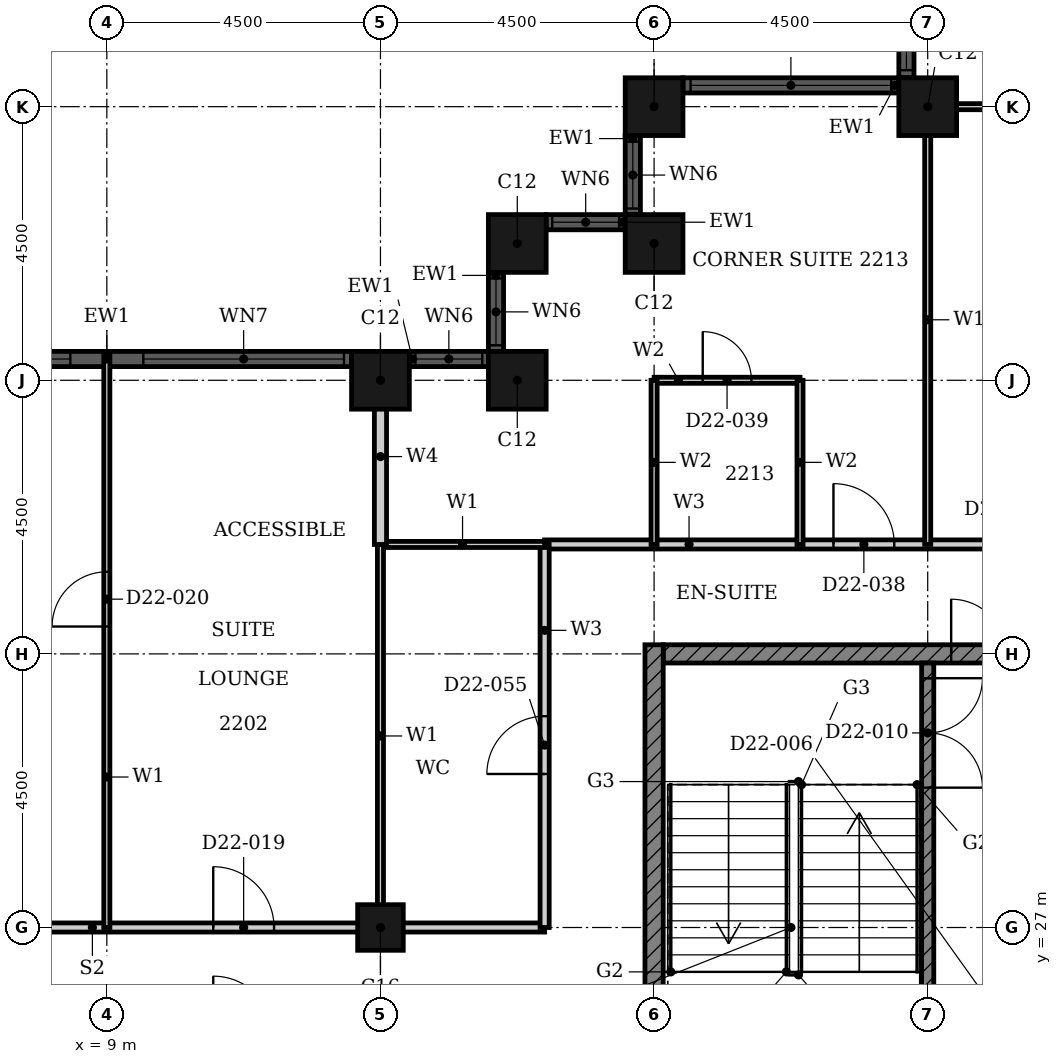
"""IFC4 building model, lengths in metres.
Left out: names, types, materials, properties, quantities, classifications, styles, units other than length and angle.
Written with IfcOpenShell. Run it as: python <this file> out.ifc"""

import sys

from ifc_helpers import new_model, si_unit, direction, frame, frame_2d, origin, origin_2d, place, context, subcontext, project, spatial, rectangle, hollow_rectangle, extrude, element, fill, save


model = new_model("IFC4")
c1 = context("Model", 3, precision=1e-05, world=origin(), true_north=direction((0.0, 1.0)))
c2 = subcontext(c1, "Body", "Model", "MODEL_VIEW")
j1 = project(units=[si_unit("LENGTHUNIT", "METRE"), si_unit("PLANEANGLEUNIT", "RADIAN")], contexts=[c1])
p1 = place(None, origin())
s1 = spatial("IfcSite", under=j1, at=p1, CompositionType="ELEMENT")
p2 = place(p1, origin())
s2 = spatial("IfcBuilding", under=s1, at=p2, CompositionType="ELEMENT")
p3 = place(p2, frame((0.0, 0.0, 92.4)))
s3 = spatial("IfcBuildingStorey", under=s2, at=p3, CompositionType="ELEMENT", Elevation=92.4)
for number, where, z_axis, x_axis in (
    (1, (22.5, 40.5, 0.0), (0.0, 0.0, 1.0), (1.0, 0.0, 0.0)),
    (2, (18.0, 40.5, 0.0), (0.0, 0.0, 1.0), (1.0, 0.0, 0.0)),
    (3, (18.0, 38.25, 0.0), (0.0, 0.0, 1.0), (1.0, 0.0, 0.0)),
    (4, (15.75, 38.25, 0.0), (0.0, 0.0, 1.0), (1.0, 0.0, 0.0)),
    (5, (15.75, 36.0, 0.0), (0.0, 0.0, 1.0), (1.0, 0.0, 0.0)),
    (6, (13.5, 36.0, 0.0), (0.0, 0.0, 1.0), (1.0, 0.0, 0.0)),
):
    element("IfcColumn", number, at=place(p3, frame(where, z_axis=z_axis, x_axis=x_axis)), inside=s3, PredefinedType="COLUMN", context=c2, shape_type="SweptSolid", body=[
        extrude(hollow_rectangle(XDim=0.95, YDim=0.95, WallThickness=0.03, at=origin_2d()), origin(), (0.0, 0.0, 1.0), 3.6),
    ])
p4 = place(p3, frame((13.5, 27.0, 0.0), z_axis=(0.0, 0.0, 1.0), x_axis=(1.0, 0.0, 0.0)))
e7 = element("IfcColumn", 7, at=p4, inside=s3, PredefinedType="COLUMN", context=c2, shape_type="SweptSolid", body=[
    extrude(hollow_rectangle(XDim=0.75, YDim=0.75, WallThickness=0.024, at=origin_2d()), origin(), (0.0, 0.0, 1.0), 3.6),
])
p5 = place(p3, frame((22.15, 49.025, 0.0), z_axis=(0.0, 0.0, 1.0), x_axis=(0.0, -1.0, 0.0)))
e8 = element("IfcWall", 8, at=p5, inside=s3, PredefinedType="SOLIDWALL", context=c2, shape_type="SweptSolid", body=[
    extrude(rectangle(XDim=8.05, YDim=0.25, at=frame_2d((4.025, 0.0))), origin(), (0.0, 0.0, 1.0), 3.6),
])
p6 = place(p5, frame((0.125, 0.0, 0.9)))
e9 = element("IfcOpeningElement", 9, at=p6, cuts=e8, PredefinedType="OPENING", context=c2, shape_type="SweptSolid", body=[
    extrude(rectangle(XDim=3.3, YDim=1.85, at=frame_2d((1.65, 0.925))), frame((0.0, 0.135, 0.0), z_axis=(0.0, -1.0, 0.0), x_axis=(1.0, 0.0, 0.0)), (0.0, 0.0, 1.0), 0.27),
])
p7 = place(p5, frame((4.625, 0.0, 0.9)))
e10 = element("IfcOpeningElement", 10, at=p7, cuts=e8, PredefinedType="OPENING", context=c2, shape_type="SweptSolid", body=[
    extrude(rectangle(XDim=3.3, YDim=1.85, at=frame_2d((1.65, 0.925))), frame((0.0, 0.135, 0.0), z_axis=(0.0, -1.0, 0.0), x_axis=(1.0, 0.0, 0.0)), (0.0, 0.0, 1.0), 0.27),
])
p8 = place(p3, frame((22.025, 40.85, 0.0), z_axis=(0.0, 0.0, 1.0), x_axis=(-1.0, 0.0, 0.0)))
e11 = element("IfcWall", 11, at=p8, inside=s3, PredefinedType="SOLIDWALL", context=c2, shape_type="SweptSolid", body=[
    extrude(rectangle(XDim=3.55, YDim=0.25, at=frame_2d((1.775, 0.0))), origin(), (0.0, 0.0, 1.0), 3.6),
])
p9 = place(p8, frame((0.125, 0.0, 0.9)))
e12 = element("IfcOpeningElement", 12, at=p9, cuts=e11, PredefinedType="OPENING", context=c2, shape_type="SweptSolid", body=[
    extrude(rectangle(XDim=3.3, YDim=1.85, at=frame_2d((1.65, 0.925))), frame((0.0, 0.135, 0.0), z_axis=(0.0, -1.0, 0.0), x_axis=(1.0, 0.0, 0.0)), (0.0, 0.0, 1.0), 0.27),
])
p10 = place(p3, frame((17.65, 40.025, 0.0), z_axis=(0.0, 0.0, 1.0), x_axis=(0.0, -1.0, 0.0)))
e13 = element("IfcWall", 13, at=p10, inside=s3, PredefinedType="SOLIDWALL", context=c2, shape_type="SweptSolid", body=[
    extrude(rectangle(XDim=1.3, YDim=0.25, at=frame_2d((0.65, 0.0))), origin(), (0.0, 0.0, 1.0), 3.6),
])
p11 = place(p10, frame((0.1, 0.0, 0.9)))
e14 = element("IfcOpeningElement", 14, at=p11, cuts=e13, PredefinedType="OPENING", context=c2, shape_type="SweptSolid", body=[
    extrude(rectangle(XDim=1.1, YDim=1.85, at=frame_2d((0.55, 0.925))), frame((0.0, 0.135, 0.0), z_axis=(0.0, -1.0, 0.0), x_axis=(1.0, 0.0, 0.0)), (0.0, 0.0, 1.0), 0.27),
])
p12 = place(p3, frame((17.525, 38.6, 0.0), z_axis=(0.0, 0.0, 1.0), x_axis=(-1.0, 0.0, 0.0)))
e15 = element("IfcWall", 15, at=p12, inside=s3, PredefinedType="SOLIDWALL", context=c2, shape_type="SweptSolid", body=[
    extrude(rectangle(XDim=1.3, YDim=0.25, at=frame_2d((0.65, 0.0))), origin(), (0.0, 0.0, 1.0), 3.6),
])
p13 = place(p12, frame((0.1, 0.0, 0.9)))
e16 = element("IfcOpeningElement", 16, at=p13, cuts=e15, PredefinedType="OPENING", context=c2, shape_type="SweptSolid", body=[
    extrude(rectangle(XDim=1.1, YDim=1.85, at=frame_2d((0.55, 0.925))), frame((0.0, 0.135, 0.0), z_axis=(0.0, -1.0, 0.0), x_axis=(1.0, 0.0, 0.0)), (0.0, 0.0, 1.0), 0.27),
])
p14 = place(p3, frame((15.4, 37.775, 0.0), z_axis=(0.0, 0.0, 1.0), x_axis=(0.0, -1.0, 0.0)))
e17 = element("IfcWall", 17, at=p14, inside=s3, PredefinedType="SOLIDWALL", context=c2, shape_type="SweptSolid", body=[
    extrude(rectangle(XDim=1.3, YDim=0.25, at=frame_2d((0.65, 0.0))), origin(), (0.0, 0.0, 1.0), 3.6),
])
p15 = place(p14, frame((0.1, 0.0, 0.9)))
e18 = element("IfcOpeningElement", 18, at=p15, cuts=e17, PredefinedType="OPENING", context=c2, shape_type="SweptSolid", body=[
    extrude(rectangle(XDim=1.1, YDim=1.85, at=frame_2d((0.55, 0.925))), frame((0.0, 0.135, 0.0), z_axis=(0.0, -1.0, 0.0), x_axis=(1.0, 0.0, 0.0)), (0.0, 0.0, 1.0), 0.27),
])
p16 = place(p3, frame((15.275, 36.35, 0.0), z_axis=(0.0, 0.0, 1.0), x_axis=(-1.0, 0.0, 0.0)))
e19 = element("IfcWall", 19, at=p16, inside=s3, PredefinedType="SOLIDWALL", context=c2, shape_type="SweptSolid", body=[
    extrude(rectangle(XDim=1.3, YDim=0.25, at=frame_2d((0.65, 0.0))), origin(), (0.0, 0.0, 1.0), 3.6),
])
p17 = place(p16, frame((0.1, 0.0, 0.9)))
e20 = element("IfcOpeningElement", 20, at=p17, cuts=e19, PredefinedType="OPENING", context=c2, shape_type="SweptSolid", body=[
    extrude(rectangle(XDim=1.1, YDim=1.85, at=frame_2d((0.55, 0.925))), frame((0.0, 0.135, 0.0), z_axis=(0.0, -1.0, 0.0), x_axis=(1.0, 0.0, 0.0)), (0.0, 0.0, 1.0), 0.27),
])
p18 = place(p3, frame((13.025, 36.35, 0.0), z_axis=(0.0, 0.0, 1.0), x_axis=(-1.0, 0.0, 0.0)))
e21 = element("IfcWall", 21, at=p18, inside=s3, PredefinedType="SOLIDWALL", context=c2, shape_type="SweptSolid", body=[
    extrude(rectangle(XDim=8.05, YDim=0.25, at=frame_2d((4.025, 0.0))), origin(), (0.0, 0.0, 1.0), 3.6),
])
p19 = place(p18, frame((0.125, 0.0, 0.9)))
e22 = element("IfcOpeningElement", 22, at=p19, cuts=e21, PredefinedType="OPENING", context=c2, shape_type="SweptSolid", body=[
    extrude(rectangle(XDim=3.3, YDim=1.85, at=frame_2d((1.65, 0.925))), frame((0.0, 0.135, 0.0), z_axis=(0.0, -1.0, 0.0), x_axis=(1.0, 0.0, 0.0)), (0.0, 0.0, 1.0), 0.27),
])
p20 = place(p18, frame((4.625, 0.0, 0.9)))
e23 = element("IfcOpeningElement", 23, at=p20, cuts=e21, PredefinedType="OPENING", context=c2, shape_type="SweptSolid", body=[
    extrude(rectangle(XDim=3.3, YDim=1.85, at=frame_2d((1.65, 0.925))), frame((0.0, 0.135, 0.0), z_axis=(0.0, -1.0, 0.0), x_axis=(1.0, 0.0, 0.0)), (0.0, 0.0, 1.0), 0.27),
])
p21 = place(p3, frame((18.15, 31.5, 0.0), z_axis=(0.0, 0.0, 1.0), x_axis=(1.0, 0.0, 0.0)))
e24 = element("IfcWall", 24, at=p21, inside=s3, PredefinedType="SHEAR", context=c2, shape_type="SweptSolid", body=[
    extrude(rectangle(XDim=6.797, YDim=0.3, at=frame_2d((3.398, 0.0))), origin(), (0.0, 0.0, 1.0), 3.2),
])
p22 = place(p21, frame((4.736, 0.0, 0.0)))
e25 = element("IfcOpeningElement", 25, at=p22, cuts=e24, PredefinedType="OPENING", context=c2, shape_type="SweptSolid", body=[
    extrude(rectangle(XDim=1.8, YDim=2.1, at=frame_2d((0.9, 1.05))), frame((0.0, 0.16, 0.0), z_axis=(0.0, -1.0, 0.0), x_axis=(1.0, 0.0, 0.0)), (0.0, 0.0, 1.0), 0.32),
])
p23 = place(p3, frame((18.0, 22.35, 0.0), z_axis=(0.0, 0.0, 1.0), x_axis=(0.0, 1.0, 0.0)))
e26 = element("IfcWall", 26, at=p23, inside=s3, PredefinedType="SHEAR", context=c2, shape_type="SweptSolid", body=[
    extrude(rectangle(XDim=9.3, YDim=0.3, at=frame_2d((4.65, 0.0))), origin(), (0.0, 0.0, 1.0), 3.2),
])
p24 = place(p3, frame((22.5, 31.35, 0.0), z_axis=(0.0, 0.0, 1.0), x_axis=(0.0, -1.0, 0.0)))
e27 = element("IfcWall", 27, at=p24, inside=s3, PredefinedType="SHEAR", context=c2, shape_type="SweptSolid", body=[
    extrude(rectangle(XDim=5.825, YDim=0.2, at=frame_2d((2.913, 0.0))), origin(), (0.0, 0.0, 1.0), 3.2),
])
p25 = place(p24, frame((0.25, 0.0, 0.0)))
e28 = element("IfcOpeningElement", 28, at=p25, cuts=e27, PredefinedType="OPENING", context=c2, shape_type="SweptSolid", body=[
    extrude(rectangle(XDim=1.8, YDim=2.1, at=frame_2d((0.9, 1.05))), frame((0.0, 0.11, 0.0), z_axis=(0.0, -1.0, 0.0), x_axis=(1.0, 0.0, 0.0)), (0.0, 0.0, 1.0), 0.22),
])
p26 = place(p3, frame((4.5, 27.0, 0.0), z_axis=(0.0, 0.0, 1.0), x_axis=(1.0, 0.0, 0.0)))
e29 = element("IfcWall", 29, at=p26, inside=s3, PredefinedType="PARTITIONING", context=c2, shape_type="SweptSolid", body=[
    extrude(rectangle(XDim=11.7, YDim=0.15, at=frame_2d((5.85, 0.0))), origin(), (0.0, 0.0, 1.0), 2.48),
])
p27 = place(p26, frame((6.25, 0.0, 0.0)))
e30 = element("IfcOpeningElement", 30, at=p27, cuts=e29, PredefinedType="OPENING", context=c2, shape_type="SweptSolid", body=[
    extrude(rectangle(XDim=1.0, YDim=2.1, at=frame_2d((0.5, 1.05))), frame((0.0, 0.085, 0.0), z_axis=(0.0, -1.0, 0.0), x_axis=(1.0, 0.0, 0.0)), (0.0, 0.0, 1.0), 0.17),
])
p28 = place(p3, frame((16.2, 33.3, 0.0), z_axis=(0.0, 0.0, 1.0), x_axis=(1.0, 0.0, 0.0)))
e31 = element("IfcWall", 31, at=p28, inside=s3, PredefinedType="PARTITIONING", context=c2, shape_type="SweptSolid", body=[
    extrude(rectangle(XDim=15.3, YDim=0.15, at=frame_2d((7.65, 0.0))), origin(), (0.0, 0.0, 1.0), 3.2),
])
p29 = place(p28, frame((4.75, 0.0, 0.0)))
e32 = element("IfcOpeningElement", 32, at=p29, cuts=e31, PredefinedType="OPENING", context=c2, shape_type="SweptSolid", body=[
    extrude(rectangle(XDim=1.0, YDim=2.1, at=frame_2d((0.5, 1.05))), frame((0.0, 0.085, 0.0), z_axis=(0.0, -1.0, 0.0), x_axis=(1.0, 0.0, 0.0)), (0.0, 0.0, 1.0), 0.17),
])
p30 = place(p28, frame((10.35, 0.0, 0.0)))
e33 = element("IfcOpeningElement", 33, at=p30, cuts=e31, PredefinedType="OPENING", context=c2, shape_type="SweptSolid", body=[
    extrude(rectangle(XDim=0.9, YDim=2.1, at=frame_2d((0.45, 1.05))), frame((0.0, 0.085, 0.0), z_axis=(0.0, -1.0, 0.0), x_axis=(1.0, 0.0, 0.0)), (0.0, 0.0, 1.0), 0.17),
])
p31 = place(p3, frame((16.2, 27.0, 0.0), z_axis=(0.0, 0.0, 1.0), x_axis=(0.0, 1.0, 0.0)))
e34 = element("IfcWall", 34, at=p31, inside=s3, PredefinedType="PARTITIONING", context=c2, shape_type="SweptSolid", body=[
    extrude(rectangle(XDim=6.3, YDim=0.15, at=frame_2d((3.15, 0.0))), origin(), (0.0, 0.0, 1.0), 3.2),
])
p32 = place(p31, frame((2.525, 0.0, 0.0)))
e35 = element("IfcOpeningElement", 35, at=p32, cuts=e34, PredefinedType="OPENING", context=c2, shape_type="SweptSolid", body=[
    extrude(rectangle(XDim=0.95, YDim=2.1, at=frame_2d((0.475, 1.05))), frame((0.0, 0.085, 0.0), z_axis=(0.0, -1.0, 0.0), x_axis=(1.0, 0.0, 0.0)), (0.0, 0.0, 1.0), 0.17),
])
p33 = place(p3, frame((13.5, 33.3, 0.0), z_axis=(0.0, 0.0, 1.0), x_axis=(1.0, 0.0, 0.0)))
e36 = element("IfcWall", 36, at=p33, inside=s3, PredefinedType="PARTITIONING", context=c2, shape_type="SweptSolid", body=[
    extrude(rectangle(XDim=2.7, YDim=0.1, at=frame_2d((1.35, 0.0))), origin(), (0.0, 0.0, 1.0), 3.2),
])
p34 = place(p3, frame((22.31, 40.5, 0.0), z_axis=(0.0, 0.0, 1.0), x_axis=(1.0, 0.0, 0.0)))
e37 = element("IfcWall", 37, at=p34, inside=s3, PredefinedType="PARTITIONING", context=c2, shape_type="SweptSolid", body=[
    extrude(rectangle(XDim=9.19, YDim=0.1, at=frame_2d((4.595, 0.0))), origin(), (0.0, 0.0, 1.0), 2.28),
])
p35 = place(p3, frame((13.5, 27.0, 0.0), z_axis=(0.0, 0.0, 1.0), x_axis=(0.0, 1.0, 0.0)))
e38 = element("IfcWall", 38, at=p35, inside=s3, PredefinedType="PARTITIONING", context=c2, shape_type="SweptSolid", body=[
    extrude(rectangle(XDim=6.3, YDim=0.1, at=frame_2d((3.15, 0.0))), origin(), (0.0, 0.0, 1.0), 2.28),
])
p36 = place(p3, frame((22.5, 33.3, 0.0), z_axis=(0.0, 0.0, 1.0), x_axis=(0.0, 1.0, 0.0)))
e39 = element("IfcWall", 39, at=p36, inside=s3, PredefinedType="PARTITIONING", context=c2, shape_type="SweptSolid", body=[
    extrude(rectangle(XDim=7.39, YDim=0.1, at=frame_2d((3.695, 0.0))), origin(), (0.0, 0.0, 1.0), 3.2),
])
p37 = place(p3, frame((9.0, 27.0, 0.0), z_axis=(0.0, 0.0, 1.0), x_axis=(0.0, 1.0, 0.0)))
e40 = element("IfcWall", 40, at=p37, inside=s3, PredefinedType="PARTITIONING", context=c2, shape_type="SweptSolid", body=[
    extrude(rectangle(XDim=9.415, YDim=0.1, at=frame_2d((4.708, 0.0))), origin(), (0.0, 0.0, 1.0), 3.2),
])
p38 = place(p37, frame((4.95, 0.0, 0.0)))
e41 = element("IfcOpeningElement", 41, at=p38, cuts=e40, PredefinedType="OPENING", context=c2, shape_type="SweptSolid", body=[
    extrude(rectangle(XDim=0.9, YDim=2.1, at=frame_2d((0.45, 1.05))), frame((0.0, 0.06, 0.0), z_axis=(0.0, -1.0, 0.0), x_axis=(1.0, 0.0, 0.0)), (0.0, 0.0, 1.0), 0.12),
])
p39 = place(p3, frame((13.5, 33.3, 0.0), z_axis=(0.0, 0.0, 1.0), x_axis=(0.0, 1.0, 0.0)))
e42 = element("IfcWall", 42, at=p39, inside=s3, PredefinedType="PARTITIONING", context=c2, shape_type="SweptSolid", body=[
    extrude(rectangle(XDim=2.89, YDim=0.2, at=frame_2d((1.445, 0.0))), origin(), (0.0, 0.0, 1.0), 2.28),
])
p40 = place(p3, frame((18.0, 36.0, 0.0), z_axis=(0.0, 0.0, 1.0), x_axis=(1.0, 0.0, 0.0)))
e43 = element("IfcWall", 43, at=p40, inside=s3, PredefinedType="PARTITIONING", context=c2, shape_type="SweptSolid", body=[
    extrude(rectangle(XDim=2.4, YDim=0.1, at=frame_2d((1.2, 0.0))), origin(), (0.0, 0.0, 1.0), 3.2),
])
p41 = place(p40, frame((0.8, 0.0, 0.0)))
e44 = element("IfcOpeningElement", 44, at=p41, cuts=e43, PredefinedType="OPENING", context=c2, shape_type="SweptSolid", body=[
    extrude(rectangle(XDim=0.8, YDim=2.1, at=frame_2d((0.4, 1.05))), frame((0.0, 0.06, 0.0), z_axis=(0.0, -1.0, 0.0), x_axis=(1.0, 0.0, 0.0)), (0.0, 0.0, 1.0), 0.12),
])
for number, where, z_axis, x_axis in (
    (45, (18.0, 33.3, 0.0), (0.0, 0.0, 1.0), (0.0, 1.0, 0.0)),
    (46, (20.4, 33.3, 0.0), (0.0, 0.0, 1.0), (0.0, 1.0, 0.0)),
):
    element("IfcWall", number, at=place(p3, frame(where, z_axis=z_axis, x_axis=x_axis)), inside=s3, PredefinedType="PARTITIONING", context=c2, shape_type="SweptSolid", body=[
        extrude(rectangle(XDim=2.7, YDim=0.1, at=frame_2d((1.35, 0.0))), origin(), (0.0, 0.0, 1.0), 3.2),
    ])
p42 = place(p7, origin())
e47 = element("IfcWindow", 47, at=p42, inside=s3, PartitioningType="SINGLE_PANEL", PredefinedType="WINDOW", context=c2, shape_type="SweptSolid", body=[
    extrude(rectangle(XDim=3.3, YDim=1.85, at=frame_2d((1.65, 0.925))), frame((0.0, 0.03, 0.0), z_axis=(0.0, -1.0, 0.0), x_axis=(1.0, 0.0, 0.0)), (0.0, 0.0, 1.0), 0.06),
])
fill(e10, e47)
p43 = place(p9, origin())
e48 = element("IfcWindow", 48, at=p43, inside=s3, PartitioningType="SINGLE_PANEL", PredefinedType="WINDOW", context=c2, shape_type="SweptSolid", body=[
    extrude(rectangle(XDim=3.3, YDim=1.85, at=frame_2d((1.65, 0.925))), frame((0.0, 0.03, 0.0), z_axis=(0.0, -1.0, 0.0), x_axis=(1.0, 0.0, 0.0)), (0.0, 0.0, 1.0), 0.06),
])
fill(e12, e48)
p44 = place(p11, origin())
e49 = element("IfcWindow", 49, at=p44, inside=s3, PartitioningType="SINGLE_PANEL", PredefinedType="WINDOW", context=c2, shape_type="SweptSolid", body=[
    extrude(rectangle(XDim=1.1, YDim=1.85, at=frame_2d((0.55, 0.925))), frame((0.0, 0.03, 0.0), z_axis=(0.0, -1.0, 0.0), x_axis=(1.0, 0.0, 0.0)), (0.0, 0.0, 1.0), 0.06),
])
fill(e14, e49)
p45 = place(p13, origin())
e50 = element("IfcWindow", 50, at=p45, inside=s3, PartitioningType="SINGLE_PANEL", PredefinedType="WINDOW", context=c2, shape_type="SweptSolid", body=[
    extrude(rectangle(XDim=1.1, YDim=1.85, at=frame_2d((0.55, 0.925))), frame((0.0, 0.03, 0.0), z_axis=(0.0, -1.0, 0.0), x_axis=(1.0, 0.0, 0.0)), (0.0, 0.0, 1.0), 0.06),
])
fill(e16, e50)
p46 = place(p15, origin())
e51 = element("IfcWindow", 51, at=p46, inside=s3, PartitioningType="SINGLE_PANEL", PredefinedType="WINDOW", context=c2, shape_type="SweptSolid", body=[
    extrude(rectangle(XDim=1.1, YDim=1.85, at=frame_2d((0.55, 0.925))), frame((0.0, 0.03, 0.0), z_axis=(0.0, -1.0, 0.0), x_axis=(1.0, 0.0, 0.0)), (0.0, 0.0, 1.0), 0.06),
])
fill(e18, e51)
p47 = place(p17, origin())
e52 = element("IfcWindow", 52, at=p47, inside=s3, PartitioningType="SINGLE_PANEL", PredefinedType="WINDOW", context=c2, shape_type="SweptSolid", body=[
    extrude(rectangle(XDim=1.1, YDim=1.85, at=frame_2d((0.55, 0.925))), frame((0.0, 0.03, 0.0), z_axis=(0.0, -1.0, 0.0), x_axis=(1.0, 0.0, 0.0)), (0.0, 0.0, 1.0), 0.06),
])
fill(e20, e52)
p48 = place(p19, origin())
e53 = element("IfcWindow", 53, at=p48, inside=s3, PartitioningType="SINGLE_PANEL", PredefinedType="WINDOW", context=c2, shape_type="SweptSolid", body=[
    extrude(rectangle(XDim=3.3, YDim=1.85, at=frame_2d((1.65, 0.925))), frame((0.0, 0.03, 0.0), z_axis=(0.0, -1.0, 0.0), x_axis=(1.0, 0.0, 0.0)), (0.0, 0.0, 1.0), 0.06),
])
fill(e22, e53)
p49 = place(p20, origin())
e54 = element("IfcWindow", 54, at=p49, inside=s3, PartitioningType="SINGLE_PANEL", PredefinedType="WINDOW", context=c2, shape_type="SweptSolid", body=[
    extrude(rectangle(XDim=3.3, YDim=1.85, at=frame_2d((1.65, 0.925))), frame((0.0, 0.03, 0.0), z_axis=(0.0, -1.0, 0.0), x_axis=(1.0, 0.0, 0.0)), (0.0, 0.0, 1.0), 0.06),
])
fill(e23, e54)
p50 = place(p25, origin())
e55 = element("IfcDoor", 55, at=p50, inside=s3, OperationType="DOUBLE_DOOR_SINGLE_SWING", PredefinedType="DOOR", context=c2, shape_type="SweptSolid", body=[
    extrude(rectangle(XDim=1.8, YDim=2.1, at=frame_2d((0.9, 1.05))), frame((0.0, 0.025, 0.0), z_axis=(0.0, -1.0, 0.0), x_axis=(1.0, 0.0, 0.0)), (0.0, 0.0, 1.0), 0.05),
])
fill(e28, e55)
p51 = place(p22, origin())
e56 = element("IfcDoor", 56, at=p51, inside=s3, OperationType="DOUBLE_DOOR_SINGLE_SWING", PredefinedType="DOOR", context=c2, shape_type="SweptSolid", body=[
    extrude(rectangle(XDim=1.8, YDim=2.1, at=frame_2d((0.9, 1.05))), frame((0.0, 0.025, 0.0), z_axis=(0.0, -1.0, 0.0), x_axis=(1.0, 0.0, 0.0)), (0.0, 0.0, 1.0), 0.05),
])
fill(e25, e56)
p52 = place(p27, origin())
e57 = element("IfcDoor", 57, at=p52, inside=s3, OperationType="SINGLE_SWING_RIGHT", PredefinedType="DOOR", context=c2, shape_type="SweptSolid", body=[
    extrude(rectangle(XDim=1.0, YDim=2.1, at=frame_2d((0.5, 1.05))), frame((0.0, 0.025, 0.0), z_axis=(0.0, -1.0, 0.0), x_axis=(1.0, 0.0, 0.0)), (0.0, 0.0, 1.0), 0.05),
])
fill(e30, e57)
p53 = place(p38, origin())
e58 = element("IfcDoor", 58, at=p53, inside=s3, OperationType="SINGLE_SWING_RIGHT", PredefinedType="DOOR", context=c2, shape_type="SweptSolid", body=[
    extrude(rectangle(XDim=0.9, YDim=2.1, at=frame_2d((0.45, 1.05))), frame((0.0, 0.025, 0.0), z_axis=(0.0, -1.0, 0.0), x_axis=(1.0, 0.0, 0.0)), (0.0, 0.0, 1.0), 0.05),
])
fill(e41, e58)
p54 = place(p29, origin())
e59 = element("IfcDoor", 59, at=p54, inside=s3, OperationType="SINGLE_SWING_RIGHT", PredefinedType="DOOR", context=c2, shape_type="SweptSolid", body=[
    extrude(rectangle(XDim=1.0, YDim=2.1, at=frame_2d((0.5, 1.05))), frame((0.0, 0.025, 0.0), z_axis=(0.0, -1.0, 0.0), x_axis=(1.0, 0.0, 0.0)), (0.0, 0.0, 1.0), 0.05),
])
fill(e32, e59)
p55 = place(p41, origin())
e60 = element("IfcDoor", 60, at=p55, inside=s3, OperationType="SINGLE_SWING_LEFT", PredefinedType="DOOR", context=c2, shape_type="SweptSolid", body=[
    extrude(rectangle(XDim=0.8, YDim=2.1, at=frame_2d((0.4, 1.05))), frame((0.0, 0.025, 0.0), z_axis=(0.0, -1.0, 0.0), x_axis=(1.0, 0.0, 0.0)), (0.0, 0.0, 1.0), 0.05),
])
fill(e44, e60)
p56 = place(p32, origin())
e61 = element("IfcDoor", 61, at=p56, inside=s3, OperationType="SINGLE_SWING_LEFT", PredefinedType="DOOR", context=c2, shape_type="SweptSolid", body=[
    extrude(rectangle(XDim=0.95, YDim=2.1, at=frame_2d((0.475, 1.05))), frame((0.0, 0.025, 0.0), z_axis=(0.0, -1.0, 0.0), x_axis=(1.0, 0.0, 0.0)), (0.0, 0.0, 1.0), 0.05),
])
fill(e35, e61)
save(model, sys.argv[1])
